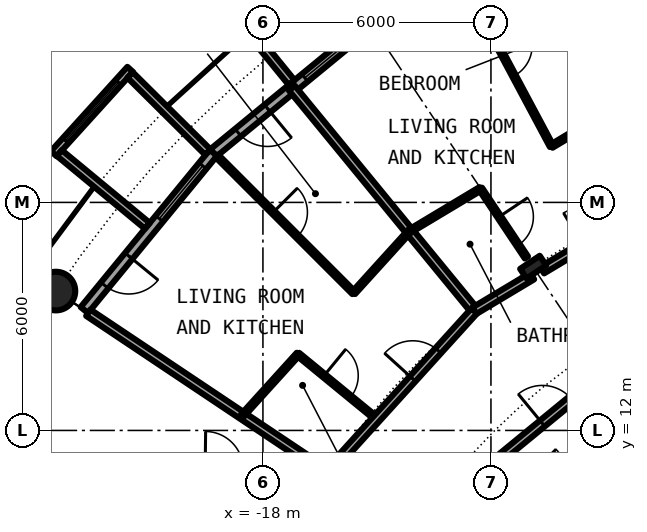
"""IFC4 building model, lengths in metres.
Left out: names, types, materials, properties, quantities, classifications, styles, units other than length and angle.
Written with IfcOpenShell. Run it as: python <this file> out.ifc"""

import sys

from ifc_helpers import new_model, si_unit, direction, frame, frame_2d, origin, origin_2d, place, context, subcontext, project, spatial, rectangle, circle, hollow_circle, i_section, extrude, element, fill, save


model = new_model("IFC4")
c1 = context("Model", 3, precision=1e-05, world=origin(), true_north=direction((0.0, 1.0)))
c2 = subcontext(c1, "Body", "Model", "MODEL_VIEW")
j1 = project(units=[si_unit("LENGTHUNIT", "METRE"), si_unit("PLANEANGLEUNIT", "RADIAN")], contexts=[c1])
p1 = place(None, origin())
s1 = spatial("IfcSite", under=j1, at=p1, CompositionType="ELEMENT")
p2 = place(p1, origin())
s2 = spatial("IfcBuilding", under=s1, at=p2, CompositionType="ELEMENT")
p3 = place(p2, frame((0.0, 0.0, 22.8)))
s3 = spatial("IfcBuildingStorey", under=s2, at=p3, CompositionType="ELEMENT", Elevation=22.8)
p4 = place(p3, frame((-23.448, 15.667, 0.0), z_axis=(0.0, 0.0, 1.0), x_axis=(1.0, 0.0, 0.0)))
e1 = element("IfcColumn", 1, at=p4, inside=s3, PredefinedType="COLUMN", context=c2, shape_type="SweptSolid", body=[
    extrude(hollow_circle(Radius=0.508, WallThickness=0.05, at=origin_2d()), origin(), (0.0, 0.0, 1.0), 3.05),
])
p5 = place(p3, frame((-10.889, 16.297, 0.0), z_axis=(0.0, 0.0, 1.0), x_axis=(-0.55557023302, 0.831469612303, 0.0)))
e2 = element("IfcColumn", 2, at=p5, inside=s3, PredefinedType="COLUMN", context=c2, shape_type="SweptSolid", body=[
    extrude(i_section(OverallWidth=0.305, OverallDepth=0.62, WebThickness=0.021, FlangeThickness=0.04, FilletRadius=0.027, at=origin_2d()), origin(), (0.0, 0.0, 1.0), 3.05),
])
p6 = place(p3, frame((-15.167, 22.699, 0.0), z_axis=(0.0, 0.0, 1.0), x_axis=(-0.773019449054, -0.634382322723, 0.0)))
e3 = element("IfcWall", 3, at=p6, inside=s3, PredefinedType="SOLIDWALL", context=c2, shape_type="SweptSolid", body=[
    extrude(rectangle(XDim=5.352, YDim=0.25, at=frame_2d((2.676, 0.0))), origin(), (0.0, 0.0, 1.0), 2.7),
])
p7 = place(p6, frame((0.441, 0.0, 0.3)))
e4 = element("IfcOpeningElement", 4, at=p7, cuts=e3, PredefinedType="OPENING", context=c2, shape_type="SweptSolid", body=[
    extrude(rectangle(XDim=1.8, YDim=2.1, at=frame_2d((0.9, 1.05))), frame((0.0, 0.135, 0.0), z_axis=(0.0, -1.0, 0.0), x_axis=(1.0, 0.0, 0.0)), (0.0, 0.0, 1.0), 0.27),
])
p8 = place(p6, frame((3.51, 0.0, 0.0)))
e5 = element("IfcOpeningElement", 5, at=p8, cuts=e3, PredefinedType="OPENING", context=c2, shape_type="SweptSolid", body=[
    extrude(rectangle(XDim=1.0, YDim=2.2, at=frame_2d((0.5, 1.1))), frame((0.0, 0.135, 0.0), z_axis=(0.0, -1.0, 0.0), x_axis=(1.0, 0.0, 0.0)), (0.0, 0.0, 1.0), 0.27),
])
p9 = place(p3, frame((-17.246, 21.155, -0.03), z_axis=(0.0, 0.0, 1.0), x_axis=(-0.631741648902, 0.775179004516, 0.0)))
e6 = element("IfcWall", 6, at=p9, inside=s3, PredefinedType="SOLIDWALL", context=c2, shape_type="SweptSolid", body=[
    extrude(rectangle(XDim=3.006, YDim=0.2, at=frame_2d((1.503, 0.0))), origin(), (0.0, 0.0, 1.0), 2.73),
])
p10 = place(p3, frame((-19.304, 19.304, 0.0), z_axis=(0.0, 0.0, 1.0), x_axis=(-0.634382322723, -0.773019449054, 0.0)))
e7 = element("IfcWall", 7, at=p10, inside=s3, PredefinedType="SOLIDWALL", context=c2, shape_type="SweptSolid", body=[
    extrude(rectangle(XDim=5.352, YDim=0.25, at=frame_2d((2.676, 0.0))), origin(), (0.0, 0.0, 1.0), 2.7),
])
p11 = place(p10, frame((0.441, 0.0, 0.3)))
e8 = element("IfcOpeningElement", 8, at=p11, cuts=e7, PredefinedType="OPENING", context=c2, shape_type="SweptSolid", body=[
    extrude(rectangle(XDim=1.8, YDim=2.1, at=frame_2d((0.9, 1.05))), frame((0.0, 0.135, 0.0), z_axis=(0.0, -1.0, 0.0), x_axis=(1.0, 0.0, 0.0)), (0.0, 0.0, 1.0), 0.27),
])
p12 = place(p10, frame((3.51, 0.0, 0.0)))
e9 = element("IfcOpeningElement", 9, at=p12, cuts=e7, PredefinedType="OPENING", context=c2, shape_type="SweptSolid", body=[
    extrude(rectangle(XDim=1.0, YDim=2.2, at=frame_2d((0.5, 1.1))), frame((0.0, 0.135, 0.0), z_axis=(0.0, -1.0, 0.0), x_axis=(1.0, 0.0, 0.0)), (0.0, 0.0, 1.0), 0.27),
])
p13 = place(p3, frame((-21.493, 21.5, -0.03), z_axis=(0.0, 0.0, 1.0), x_axis=(-0.671506829416, -0.740998365753, 0.0)))
e10 = element("IfcWall", 10, at=p13, inside=s3, PredefinedType="SOLIDWALL", context=c2, shape_type="SweptSolid", body=[
    extrude(rectangle(XDim=2.993, YDim=0.2, at=frame_2d((1.497, 0.0))), origin(), (0.0, 0.0, 1.0), 2.73),
])
p14 = place(p13, frame((0.457, 0.0, 0.33)))
e11 = element("IfcOpeningElement", 11, at=p14, cuts=e10, PredefinedType="OPENING", context=c2, shape_type="SweptSolid", body=[
    extrude(circle(Radius=1.04, at=frame_2d((1.04, 1.04))), frame((0.0, 0.11, 0.0), z_axis=(0.0, -1.0, 0.0), x_axis=(1.0, 0.0, 0.0)), (0.0, 0.0, 1.0), 0.22),
])
p15 = place(p3, frame((-19.45, 19.323, -0.03), z_axis=(0.0, 0.0, 1.0), x_axis=(-0.709727076896, 0.704476739375, 0.0)))
e12 = element("IfcWall", 12, at=p15, inside=s3, PredefinedType="SOLIDWALL", context=c2, shape_type="SweptSolid", body=[
    extrude(rectangle(XDim=2.883, YDim=0.2, at=frame_2d((1.441, 0.0))), origin(), (0.0, 0.0, 1.0), 2.73),
])
p16 = place(p3, frame((-21.041, 17.384, -0.03), z_axis=(0.0, 0.0, 1.0), x_axis=(-0.770784861449, 0.63709551667, 0.0)))
e13 = element("IfcWall", 13, at=p16, inside=s3, PredefinedType="SOLIDWALL", context=c2, shape_type="SweptSolid", body=[
    extrude(rectangle(XDim=3.006, YDim=0.2, at=frame_2d((1.503, 0.0))), origin(), (0.0, 0.0, 1.0), 2.73),
])
p17 = place(p3, frame((-22.596, 15.097, 0.0), z_axis=(0.0, 0.0, 1.0), x_axis=(0.831507055747, -0.555514190857, 0.0)))
e14 = element("IfcWall", 14, at=p17, inside=s3, PredefinedType="PARTITIONING", context=c2, shape_type="SweptSolid", body=[
    extrude(rectangle(XDim=7.265, YDim=0.2, at=frame_2d((3.633, 0.0))), origin(), (0.0, 0.0, 1.0), 2.7),
])
p18 = place(p3, frame((-19.21, 19.222, 0.0), z_axis=(0.0, 0.0, 1.0), x_axis=(0.706914880313, -0.707298629994, 0.0)))
e15 = element("IfcWall", 15, at=p18, inside=s3, PredefinedType="PARTITIONING", context=c2, shape_type="SweptSolid", body=[
    extrude(rectangle(XDim=5.09, YDim=0.1, at=frame_2d((2.545, 0.0))), origin(), (0.0, 0.0, 1.0), 2.7),
])
p19 = place(p18, frame((2.095, 0.0, 0.0)))
e16 = element("IfcOpeningElement", 16, at=p19, cuts=e15, PredefinedType="OPENING", context=c2, shape_type="SweptSolid", body=[
    extrude(rectangle(XDim=0.9, YDim=2.3, at=frame_2d((0.45, 1.15))), frame((0.0, 0.06, 0.0), z_axis=(0.0, -1.0, 0.0), x_axis=(1.0, 0.0, 0.0)), (0.0, 0.0, 1.0), 0.12),
])
p20 = place(p3, frame((-17.239, 21.008, 0.0), z_axis=(0.0, 0.0, 1.0), x_axis=(0.634318093068, -0.773072154981, 0.0)))
e17 = element("IfcWall", 17, at=p20, inside=s3, PredefinedType="PARTITIONING", context=c2, shape_type="SweptSolid", body=[
    extrude(rectangle(XDim=7.576, YDim=0.2, at=frame_2d((3.788, 0.0))), origin(), (0.0, 0.0, 1.0), 2.7),
])
p21 = place(p3, frame((-17.079, 14.004, 0.0), z_axis=(0.0, 0.0, 1.0), x_axis=(0.773424377054, -0.633888580887, 0.0)))
e18 = element("IfcWall", 18, at=p21, inside=s3, PredefinedType="PARTITIONING", context=c2, shape_type="SweptSolid", body=[
    extrude(rectangle(XDim=2.675, YDim=0.1, at=frame_2d((1.338, 0.0))), origin(), (0.0, 0.0, 1.0), 2.7),
])
p22 = place(p21, frame((0.888, 0.0, 0.0)))
e19 = element("IfcOpeningElement", 19, at=p22, cuts=e18, PredefinedType="OPENING", context=c2, shape_type="SweptSolid", body=[
    extrude(rectangle(XDim=0.9, YDim=2.3, at=frame_2d((0.45, 1.15))), frame((0.0, 0.06, 0.0), z_axis=(0.0, -1.0, 0.0), x_axis=(1.0, 0.0, 0.0)), (0.0, 0.0, 1.0), 0.12),
])
p23 = place(p3, frame((-12.803, 23.97, 0.0), z_axis=(0.0, 0.0, 1.0), x_axis=(0.471170755767, -0.882042016522, 0.0)))
e20 = element("IfcWall", 20, at=p23, inside=s3, PredefinedType="PARTITIONING", context=c2, shape_type="SweptSolid", body=[
    extrude(rectangle(XDim=5.089, YDim=0.1, at=frame_2d((2.545, 0.0))), origin(), (0.0, 0.0, 1.0), 2.7),
])
p24 = place(p23, frame((2.095, 0.0, 0.0)))
e21 = element("IfcOpeningElement", 21, at=p24, cuts=e20, PredefinedType="OPENING", context=c2, shape_type="SweptSolid", body=[
    extrude(rectangle(XDim=0.9, YDim=2.3, at=frame_2d((0.45, 1.15))), frame((0.0, 0.06, 0.0), z_axis=(0.0, -1.0, 0.0), x_axis=(1.0, 0.0, 0.0)), (0.0, 0.0, 1.0), 0.12),
])
p25 = place(p3, frame((-12.276, 18.36, 0.0), z_axis=(0.0, 0.0, 1.0), x_axis=(0.55563200073, -0.831428337119, 0.0)))
e22 = element("IfcWall", 22, at=p25, inside=s3, PredefinedType="PARTITIONING", context=c2, shape_type="SweptSolid", body=[
    extrude(rectangle(XDim=2.176, YDim=0.1, at=frame_2d((1.088, 0.0))), origin(), (0.0, 0.0, 1.0), 2.7),
])
p26 = place(p25, frame((0.887, 0.0, 0.0)))
e23 = element("IfcOpeningElement", 23, at=p26, cuts=e22, PredefinedType="OPENING", context=c2, shape_type="SweptSolid", body=[
    extrude(rectangle(XDim=0.9, YDim=2.3, at=frame_2d((0.45, 1.15))), frame((0.0, 0.06, 0.0), z_axis=(0.0, -1.0, 0.0), x_axis=(1.0, 0.0, 0.0)), (0.0, 0.0, 1.0), 0.12),
])
p27 = place(p3, frame((-11.524, 11.464, 0.0), z_axis=(0.0, 0.0, 1.0), x_axis=(0.708796844581, -0.705412668665, 0.0)))
e24 = element("IfcWall", 24, at=p27, inside=s3, PredefinedType="PARTITIONING", context=c2, shape_type="SweptSolid", body=[
    extrude(rectangle(XDim=2.597, YDim=0.1, at=frame_2d((1.299, 0.0))), origin(), (0.0, 0.0, 1.0), 2.7),
])
p28 = place(p27, frame((0.849, 0.0, 0.0)))
e25 = element("IfcOpeningElement", 25, at=p28, cuts=e24, PredefinedType="OPENING", context=c2, shape_type="SweptSolid", body=[
    extrude(rectangle(XDim=0.9, YDim=2.3, at=frame_2d((0.45, 1.15))), frame((0.0, 0.06, 0.0), z_axis=(0.0, -1.0, 0.0), x_axis=(1.0, 0.0, 0.0)), (0.0, 0.0, 1.0), 0.12),
])
p29 = place(p3, frame((-10.398, 25.106, 0.0), z_axis=(0.0, 0.0, 1.0), x_axis=(0.382490346157, -0.923959487801, 0.0)))
e26 = element("IfcWall", 26, at=p29, inside=s3, PredefinedType="PARTITIONING", context=c2, shape_type="SweptSolid", body=[
    extrude(rectangle(XDim=7.574, YDim=0.2, at=frame_2d((3.787, 0.0))), origin(), (0.0, 0.0, 1.0), 2.7),
])
p30 = place(p3, frame((-14.039, 9.4, 0.0), z_axis=(0.0, 0.0, 1.0), x_axis=(0.77298340166, 0.634426245326, 0.0)))
e27 = element("IfcWall", 27, at=p30, inside=s3, PredefinedType="PARTITIONING", context=c2, shape_type="SweptSolid", body=[
    extrude(rectangle(XDim=9.793, YDim=0.2, at=frame_2d((4.896, 0.0))), origin(), (0.0, 0.0, 1.0), 2.7),
])
p31 = place(p30, frame((4.389, 0.0, 0.0)))
e28 = element("IfcOpeningElement", 28, at=p31, cuts=e27, PredefinedType="OPENING", context=c2, shape_type="SweptSolid", body=[
    extrude(rectangle(XDim=1.0, YDim=2.3, at=frame_2d((0.5, 1.15))), frame((0.0, 0.11, 0.0), z_axis=(0.0, -1.0, 0.0), x_axis=(1.0, 0.0, 0.0)), (0.0, 0.0, 1.0), 0.22),
])
p32 = place(p3, frame((-16.193, 11.003, 0.0), z_axis=(0.0, 0.0, 1.0), x_axis=(0.671514934772, 0.740991020444, 0.0)))
e29 = element("IfcWall", 29, at=p32, inside=s3, PredefinedType="PARTITIONING", context=c2, shape_type="SweptSolid", body=[
    extrude(rectangle(XDim=5.598, YDim=0.2, at=frame_2d((2.799, 0.0))), origin(), (0.0, 0.0, 1.0), 2.38),
])
p33 = place(p32, frame((3.18, 0.0, 0.0)))
e30 = element("IfcOpeningElement", 30, at=p33, cuts=e29, PredefinedType="OPENING", context=c2, shape_type="SweptSolid", body=[
    extrude(rectangle(XDim=1.0, YDim=2.3, at=frame_2d((0.5, 1.15))), frame((0.0, 0.11, 0.0), z_axis=(0.0, -1.0, 0.0), x_axis=(1.0, 0.0, 0.0)), (0.0, 0.0, 1.0), 0.22),
])
p34 = place(p3, frame((-12.434, 15.151, 0.0), z_axis=(0.0, 0.0, 1.0), x_axis=(0.857809047014, 0.513968519329, 0.0)))
e31 = element("IfcWall", 31, at=p34, inside=s3, PredefinedType="PARTITIONING", context=c2, shape_type="SweptSolid", body=[
    extrude(rectangle(XDim=1.771, YDim=0.2, at=frame_2d((0.885, 0.0))), origin(), (0.0, 0.0, 1.0), 2.38),
])
p35 = place(p3, frame((-10.653, 16.218, 0.0), z_axis=(0.0, 0.0, 1.0), x_axis=(0.857656999296, 0.514222200569, 0.0)))
e32 = element("IfcWall", 32, at=p35, inside=s3, PredefinedType="PARTITIONING", context=c2, shape_type="SweptSolid", body=[
    extrude(rectangle(XDim=3.675, YDim=0.2, at=frame_2d((1.838, 0.0))), origin(), (0.0, 0.0, 1.0), 2.38),
])
p36 = place(p35, frame((1.257, 0.0, 0.0)))
e33 = element("IfcOpeningElement", 33, at=p36, cuts=e32, PredefinedType="OPENING", context=c2, shape_type="SweptSolid", body=[
    extrude(rectangle(XDim=1.0, YDim=2.3, at=frame_2d((0.5, 1.15))), frame((0.0, 0.11, 0.0), z_axis=(0.0, -1.0, 0.0), x_axis=(1.0, 0.0, 0.0)), (0.0, 0.0, 1.0), 0.22),
])
p37 = place(p3, frame((-18.538, 12.394, 0.0), z_axis=(0.0, 0.0, 1.0), x_axis=(0.67169789574, 0.740825172937, 0.0)))
e34 = element("IfcWall", 34, at=p37, inside=s3, PredefinedType="PARTITIONING", context=c2, shape_type="SweptSolid", body=[
    extrude(rectangle(XDim=2.183, YDim=0.1, at=frame_2d((1.091, 0.0))), origin(), (0.0, 0.0, 1.0), 2.7),
])
p38 = place(p3, frame((-15.612, 15.622, 0.0), z_axis=(0.0, 0.0, 1.0), x_axis=(0.671674967707, 0.740845960882, 0.0)))
e35 = element("IfcWall", 35, at=p38, inside=s3, PredefinedType="PARTITIONING", context=c2, shape_type="SweptSolid", body=[
    extrude(rectangle(XDim=2.181, YDim=0.1, at=frame_2d((1.091, 0.0))), origin(), (0.0, 0.0, 1.0), 2.7),
])
for number, where, z_axis, x_axis in (
    (36, (-14.147, 17.237, 0.0), (0.0, 0.0, 1.0), (0.858, 0.514, 0.0)),
    (37, (-10.405, 19.481, 0.0), (0.0, 0.0, 1.0), (0.858, 0.514, 0.0)),
):
    element("IfcWall", number, at=place(p3, frame(where, z_axis=z_axis, x_axis=x_axis)), inside=s3, PredefinedType="PARTITIONING", context=c2, shape_type="SweptSolid", body=[
        extrude(rectangle(XDim=2.182, YDim=0.1, at=frame_2d((1.091, 0.0))), origin(), (0.0, 0.0, 1.0), 2.7),
    ])
p39 = place(p7, origin())
e38 = element("IfcWindow", 38, at=p39, inside=s3, PartitioningType="SINGLE_PANEL", PredefinedType="WINDOW", context=c2, shape_type="SweptSolid", body=[
    extrude(rectangle(XDim=1.8, YDim=2.1, at=frame_2d((0.9, 1.05))), frame((0.0, 0.03, 0.0), z_axis=(0.0, -1.0, 0.0), x_axis=(1.0, 0.0, 0.0)), (0.0, 0.0, 1.0), 0.06),
])
fill(e4, e38)
p40 = place(p8, origin())
e39 = element("IfcDoor", 39, at=p40, inside=s3, OperationType="SINGLE_SWING_LEFT", PredefinedType="DOOR", context=c2, shape_type="SweptSolid", body=[
    extrude(rectangle(XDim=1.0, YDim=2.2, at=frame_2d((0.5, 1.1))), frame((0.0, 0.025, 0.0), z_axis=(0.0, -1.0, 0.0), x_axis=(1.0, 0.0, 0.0)), (0.0, 0.0, 1.0), 0.05),
])
fill(e5, e39)
p41 = place(p11, origin())
e40 = element("IfcWindow", 40, at=p41, inside=s3, PartitioningType="SINGLE_PANEL", PredefinedType="WINDOW", context=c2, shape_type="SweptSolid", body=[
    extrude(rectangle(XDim=1.8, YDim=2.1, at=frame_2d((0.9, 1.05))), frame((0.0, 0.03, 0.0), z_axis=(0.0, -1.0, 0.0), x_axis=(1.0, 0.0, 0.0)), (0.0, 0.0, 1.0), 0.06),
])
fill(e8, e40)
p42 = place(p14, origin())
e41 = element("IfcWindow", 41, at=p42, inside=s3, PartitioningType="SINGLE_PANEL", PredefinedType="WINDOW", context=c2, shape_type="SweptSolid", body=[
    extrude(circle(Radius=1.04, at=frame_2d((1.04, 1.04))), frame((0.0, 0.03, 0.0), z_axis=(0.0, -1.0, 0.0), x_axis=(1.0, 0.0, 0.0)), (0.0, 0.0, 1.0), 0.06),
])
fill(e11, e41)
p43 = place(p12, origin())
e42 = element("IfcDoor", 42, at=p43, inside=s3, OperationType="SINGLE_SWING_LEFT", PredefinedType="DOOR", context=c2, shape_type="SweptSolid", body=[
    extrude(rectangle(XDim=1.0, YDim=2.2, at=frame_2d((0.5, 1.1))), frame((0.0, 0.025, 0.0), z_axis=(0.0, -1.0, 0.0), x_axis=(1.0, 0.0, 0.0)), (0.0, 0.0, 1.0), 0.05),
])
fill(e9, e42)
p44 = place(p26, origin())
e43 = element("IfcDoor", 43, at=p44, inside=s3, OperationType="SINGLE_SWING_RIGHT", PredefinedType="DOOR", context=c2, shape_type="SweptSolid", body=[
    extrude(rectangle(XDim=0.9, YDim=2.3, at=frame_2d((0.45, 1.15))), frame((0.0, 0.025, 0.0), z_axis=(0.0, -1.0, 0.0), x_axis=(1.0, 0.0, 0.0)), (0.0, 0.0, 1.0), 0.05),
])
fill(e23, e43)
p45 = place(p24, origin())
e44 = element("IfcDoor", 44, at=p45, inside=s3, OperationType="SINGLE_SWING_RIGHT", PredefinedType="DOOR", context=c2, shape_type="SweptSolid", body=[
    extrude(rectangle(XDim=0.9, YDim=2.3, at=frame_2d((0.45, 1.15))), frame((0.0, 0.025, 0.0), z_axis=(0.0, -1.0, 0.0), x_axis=(1.0, 0.0, 0.0)), (0.0, 0.0, 1.0), 0.05),
])
fill(e21, e44)
p46 = place(p33, origin())
e45 = element("IfcDoor", 45, at=p46, inside=s3, OperationType="SINGLE_SWING_RIGHT", PredefinedType="DOOR", context=c2, shape_type="SweptSolid", body=[
    extrude(rectangle(XDim=1.0, YDim=2.3, at=frame_2d((0.5, 1.15))), frame((0.0, 0.025, 0.0), z_axis=(0.0, -1.0, 0.0), x_axis=(1.0, 0.0, 0.0)), (0.0, 0.0, 1.0), 0.05),
])
fill(e30, e45)
p47 = place(p22, origin())
e46 = element("IfcDoor", 46, at=p47, inside=s3, OperationType="SINGLE_SWING_LEFT", PredefinedType="DOOR", context=c2, shape_type="SweptSolid", body=[
    extrude(rectangle(XDim=0.9, YDim=2.3, at=frame_2d((0.45, 1.15))), frame((0.0, 0.025, 0.0), z_axis=(0.0, -1.0, 0.0), x_axis=(1.0, 0.0, 0.0)), (0.0, 0.0, 1.0), 0.05),
])
fill(e19, e46)
p48 = place(p19, origin())
e47 = element("IfcDoor", 47, at=p48, inside=s3, OperationType="SINGLE_SWING_RIGHT", PredefinedType="DOOR", context=c2, shape_type="SweptSolid", body=[
    extrude(rectangle(XDim=0.9, YDim=2.3, at=frame_2d((0.45, 1.15))), frame((0.0, 0.025, 0.0), z_axis=(0.0, -1.0, 0.0), x_axis=(1.0, 0.0, 0.0)), (0.0, 0.0, 1.0), 0.05),
])
fill(e16, e47)
p49 = place(p31, origin())
e48 = element("IfcDoor", 48, at=p49, inside=s3, OperationType="SINGLE_SWING_LEFT", PredefinedType="DOOR", context=c2, shape_type="SweptSolid", body=[
    extrude(rectangle(XDim=1.0, YDim=2.3, at=frame_2d((0.5, 1.15))), frame((0.0, 0.025, 0.0), z_axis=(0.0, -1.0, 0.0), x_axis=(1.0, 0.0, 0.0)), (0.0, 0.0, 1.0), 0.05),
])
fill(e28, e48)
save(model, sys.argv[1])
